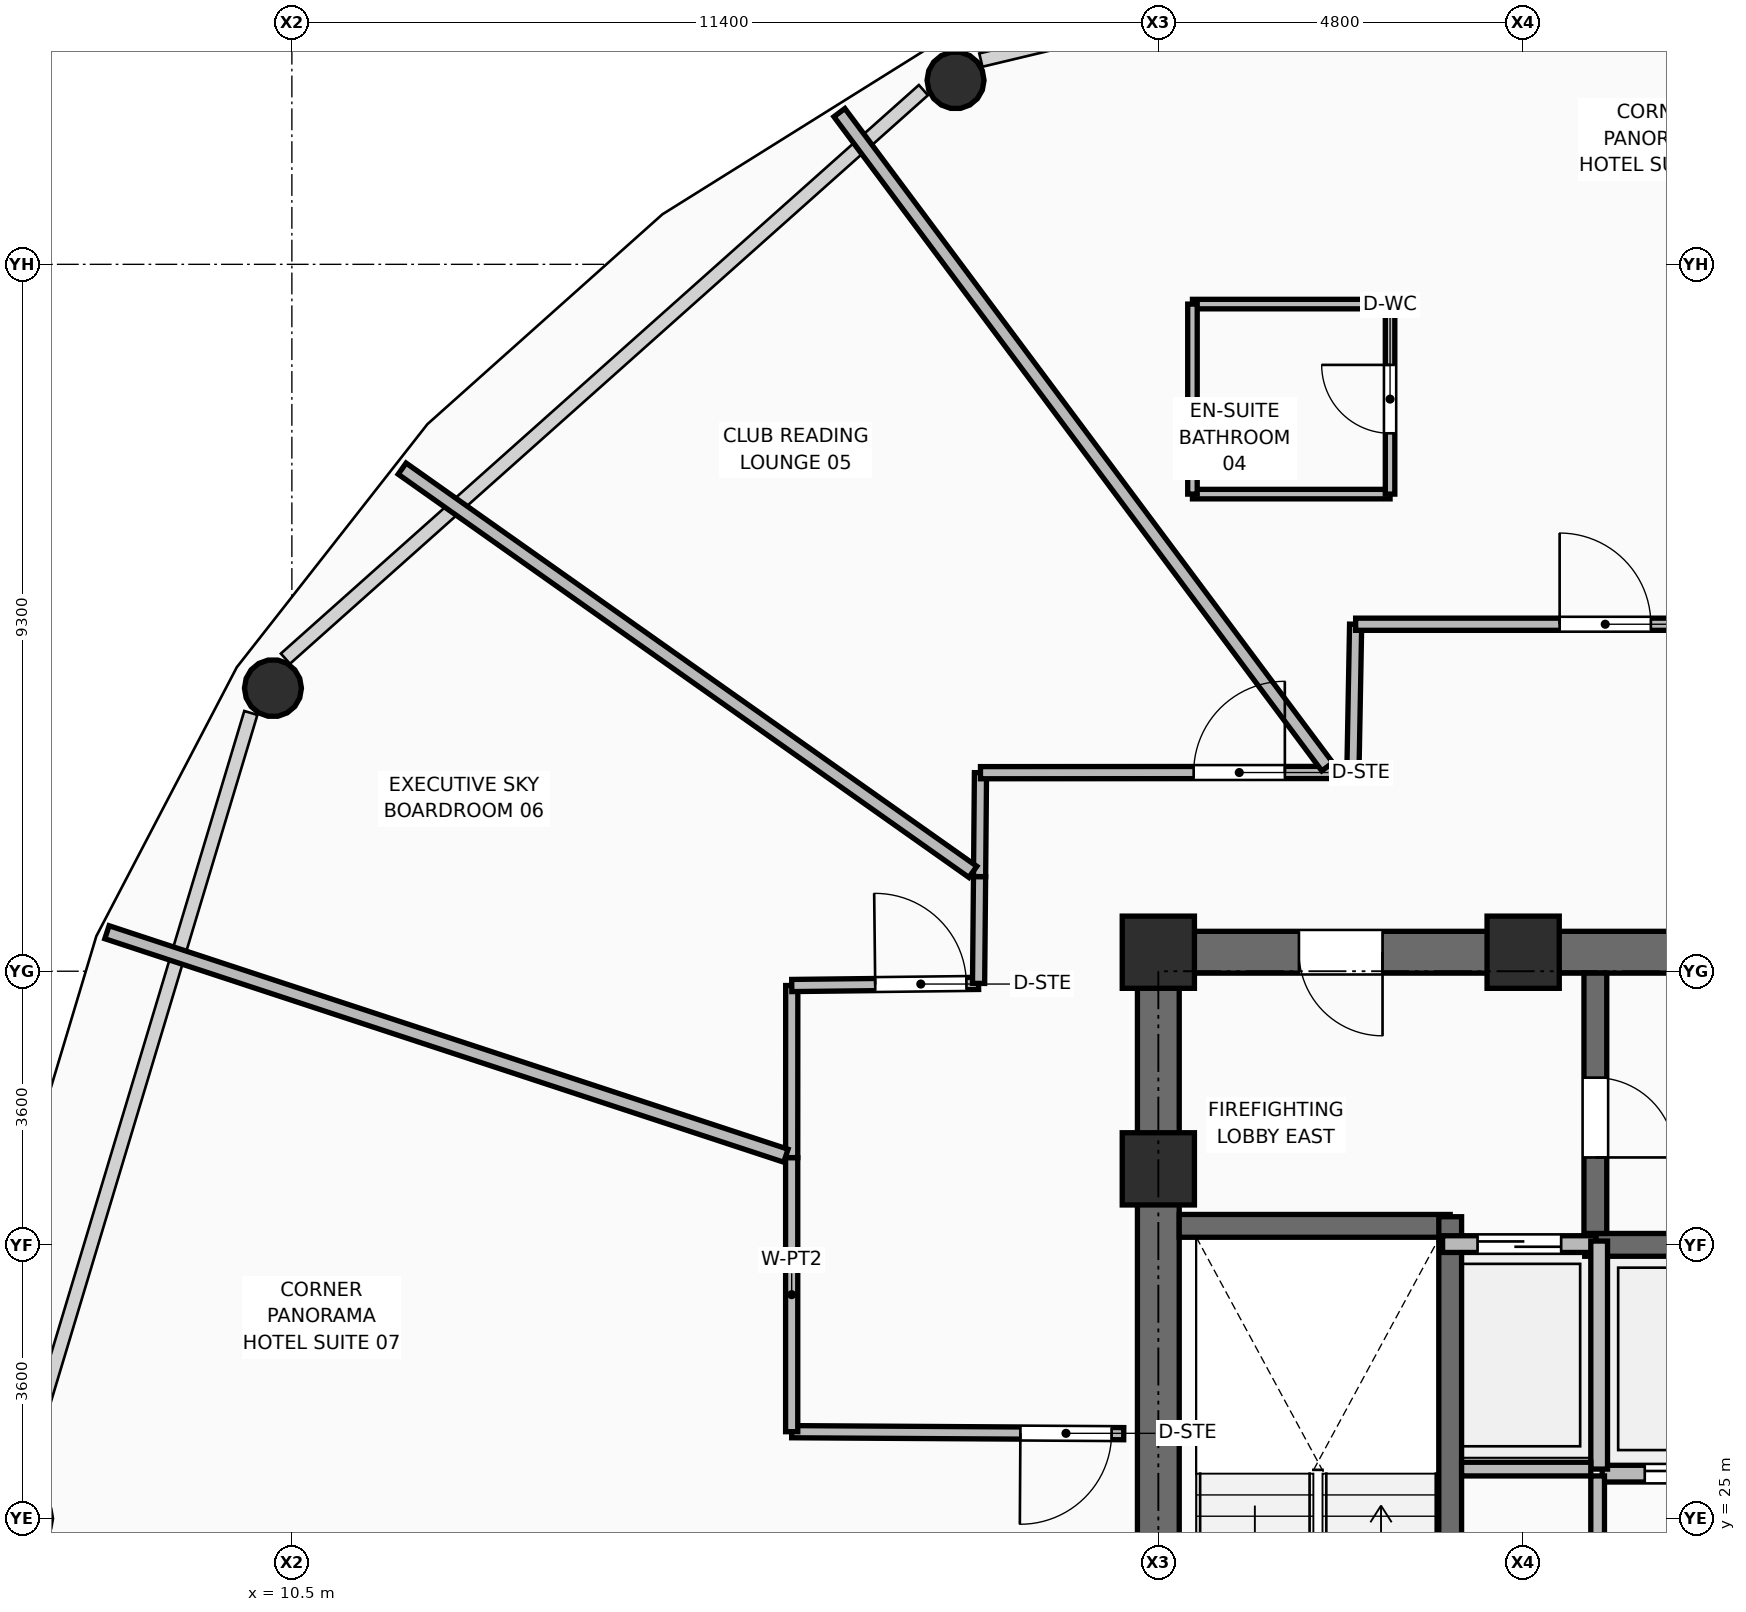
"""IFC4 building model, lengths in metres.
Left out: names, types, materials, properties, quantities, classifications, styles, units other than length and angle.
Written with IfcOpenShell. Run it as: python <this file> out.ifc"""

import sys

from ifc_helpers import new_model, si_unit, direction, frame, frame_2d, origin, origin_2d, place, context, subcontext, project, spatial, rectangle, hollow_circle, extrude, element, fill, save


model = new_model("IFC4")
c1 = context("Model", 3, precision=1e-05, world=origin(), true_north=direction((0.0, 1.0)))
c2 = subcontext(c1, "Body", "Model", "MODEL_VIEW")
j1 = project(units=[si_unit("LENGTHUNIT", "METRE"), si_unit("PLANEANGLEUNIT", "RADIAN")], contexts=[c1])
p1 = place(None, origin())
s1 = spatial("IfcSite", under=j1, at=p1, CompositionType="ELEMENT")
p2 = place(p1, origin())
s2 = spatial("IfcBuilding", under=s1, at=p2, CompositionType="ELEMENT")
p3 = place(p2, frame((0.0, 0.0, 164.7)))
s3 = spatial("IfcBuildingStorey", under=s2, at=p3, CompositionType="ELEMENT", Elevation=164.7)
for number, where, z_axis, x_axis in (
    (1, (21.9, 29.6, 0.0), (0.0, 0.0, 1.0), (1.0, 0.0, 0.0)),
    (2, (21.9, 32.45, 0.0), (0.0, 0.0, 1.0), (1.0, 0.0, 0.0)),
    (3, (26.7, 32.45, 0.0), (0.0, 0.0, 1.0), (1.0, 0.0, 0.0)),
):
    element("IfcColumn", number, at=place(p3, frame(where, z_axis=z_axis, x_axis=x_axis)), inside=s3, PredefinedType="COLUMN", context=c2, shape_type="SweptSolid", body=[
        extrude(rectangle(XDim=0.95, YDim=0.95, at=origin_2d()), origin(), (0.0, 0.0, 1.0), 3.75),
    ])
for number, where, z_axis, x_axis in (
    (4, (19.232, 43.921, 0.0), (0.0, 0.0, 1.0), (1.0, 0.0, 0.0)),
    (5, (10.251, 35.924, 0.0), (0.0, 0.0, 1.0), (1.0, 0.0, 0.0)),
):
    element("IfcColumn", number, at=place(p3, frame(where, z_axis=z_axis, x_axis=x_axis)), inside=s3, PredefinedType="COLUMN", context=c2, shape_type="SweptSolid", body=[
        extrude(hollow_circle(Radius=0.375, WallThickness=0.035, at=origin_2d()), origin(), (0.0, 0.0, 1.0), 3.57),
    ])
p4 = place(p3, frame((21.625, 32.45, 0.0), z_axis=(0.0, 0.0, 1.0), x_axis=(1.0, 0.0, 0.0)))
e6 = element("IfcWall", 6, at=p4, inside=s3, PredefinedType="SHEAR", context=c2, shape_type="SweptSolid", body=[
    extrude(rectangle(XDim=19.75, YDim=0.55, at=frame_2d((9.875, 0.0))), origin(), (0.0, 0.0, 1.0), 3.57),
])
p5 = place(p4, frame((2.125, 0.0, 0.0)))
e7 = element("IfcOpeningElement", 7, at=p5, cuts=e6, PredefinedType="OPENING", context=c2, shape_type="SweptSolid", body=[
    extrude(rectangle(XDim=1.1, YDim=2.1, at=frame_2d((0.55, 1.05))), frame((0.0, 0.285, 0.0), z_axis=(0.0, -1.0, 0.0), x_axis=(1.0, 0.0, 0.0)), (0.0, 0.0, 1.0), 0.57),
])
p6 = place(p4, frame((15.515, 0.0, 0.0)))
e8 = element("IfcOpeningElement", 8, at=p6, cuts=e6, PredefinedType="OPENING", context=c2, shape_type="SweptSolid", body=[
    extrude(rectangle(XDim=1.0, YDim=2.1, at=frame_2d((0.5, 1.05))), frame((0.0, 0.285, 0.0), z_axis=(0.0, -1.0, 0.0), x_axis=(1.0, 0.0, 0.0)), (0.0, 0.0, 1.0), 0.57),
])
p7 = place(p4, frame((17.525, 0.0, 0.0)))
e9 = element("IfcOpeningElement", 9, at=p7, cuts=e6, PredefinedType="OPENING", context=c2, shape_type="SweptSolid", body=[
    extrude(rectangle(XDim=0.9, YDim=2.1, at=frame_2d((0.45, 1.05))), frame((0.0, 0.285, 0.0), z_axis=(0.0, -1.0, 0.0), x_axis=(1.0, 0.0, 0.0)), (0.0, 0.0, 1.0), 0.57),
])
p8 = place(p3, frame((21.9, 18.075, 0.0), z_axis=(0.0, 0.0, 1.0), x_axis=(0.0, 1.0, 0.0)))
e10 = element("IfcWall", 10, at=p8, inside=s3, PredefinedType="SHEAR", context=c2, shape_type="SweptSolid", body=[
    extrude(rectangle(XDim=14.1, YDim=0.55, at=frame_2d((7.05, 0.0))), origin(), (0.0, 0.0, 1.0), 3.57),
])
p9 = place(p3, frame((22.175, 28.85, 0.0), z_axis=(0.0, 0.0, 1.0), x_axis=(1.0, 0.0, 0.0)))
e11 = element("IfcWall", 11, at=p9, inside=s3, PredefinedType="SHEAR", context=c2, shape_type="SweptSolid", body=[
    extrude(rectangle(XDim=3.565, YDim=0.3, at=frame_2d((1.782, 0.0))), origin(), (0.0, 0.0, 1.0), 3.57),
])
p10 = place(p3, frame((25.74, 20.98, 0.0), z_axis=(0.0, 0.0, 1.0), x_axis=(0.0, 1.0, 0.0)))
e12 = element("IfcWall", 12, at=p10, inside=s3, PredefinedType="SHEAR", context=c2, shape_type="SweptSolid", body=[
    extrude(rectangle(XDim=7.99, YDim=0.3, at=frame_2d((3.995, 0.0))), origin(), (0.0, 0.0, 1.0), 3.57),
])
p11 = place(p3, frame((27.51, 28.6, 0.0), z_axis=(0.0, 0.0, 1.0), x_axis=(1.0, 0.0, 0.0)))
e13 = element("IfcWall", 13, at=p11, inside=s3, PredefinedType="SHEAR", context=c2, shape_type="SweptSolid", body=[
    extrude(rectangle(XDim=8.03, YDim=0.3, at=frame_2d((4.015, 0.0))), origin(), (0.0, 0.0, 1.0), 3.57),
])
p12 = place(p3, frame((27.65, 28.75, 0.0), z_axis=(0.0, 0.0, 1.0), x_axis=(0.0, 1.0, 0.0)))
e14 = element("IfcWall", 14, at=p12, inside=s3, PredefinedType="SHEAR", context=c2, shape_type="SweptSolid", body=[
    extrude(rectangle(XDim=3.425, YDim=0.3, at=frame_2d((1.712, 0.0))), origin(), (0.0, 0.0, 1.0), 3.57),
])
p13 = place(p12, frame((1.0, 0.0, 0.0)))
e15 = element("IfcOpeningElement", 15, at=p13, cuts=e14, PredefinedType="OPENING", context=c2, shape_type="SweptSolid", body=[
    extrude(rectangle(XDim=1.05, YDim=2.1, at=frame_2d((0.525, 1.05))), frame((0.0, 0.16, 0.0), z_axis=(0.0, -1.0, 0.0), x_axis=(1.0, 0.0, 0.0)), (0.0, 0.0, 1.0), 0.32),
])
p14 = place(p3, frame((25.64, 28.61, 0.0), z_axis=(0.0, 0.0, 1.0), x_axis=(1.0, 0.0, 0.0)))
e16 = element("IfcWall", 16, at=p14, inside=s3, PredefinedType="PARTITIONING", context=c2, shape_type="SweptSolid", body=[
    extrude(rectangle(XDim=2.02, YDim=0.22, at=frame_2d((1.01, 0.0))), origin(), (0.0, 0.0, 1.0), 3.55),
])
p15 = place(p14, frame((0.46, 0.0, 0.0)))
e17 = element("IfcOpeningElement", 17, at=p15, cuts=e16, PredefinedType="OPENING", context=c2, shape_type="SweptSolid", body=[
    extrude(rectangle(XDim=1.1, YDim=2.2, at=frame_2d((0.55, 1.1))), frame((0.0, 0.12, 0.0), z_axis=(0.0, -1.0, 0.0), x_axis=(1.0, 0.0, 0.0)), (0.0, 0.0, 1.0), 0.24),
])
p16 = place(p3, frame((27.74, 25.59, 0.0), z_axis=(0.0, 0.0, 1.0), x_axis=(1.0, 0.0, 0.0)))
e18 = element("IfcWall", 18, at=p16, inside=s3, PredefinedType="PARTITIONING", context=c2, shape_type="SweptSolid", body=[
    extrude(rectangle(XDim=2.22, YDim=0.22, at=frame_2d((1.11, 0.0))), origin(), (0.0, 0.0, 1.0), 3.55),
])
p17 = place(p16, frame((0.56, 0.0, 0.0)))
e19 = element("IfcOpeningElement", 19, at=p17, cuts=e18, PredefinedType="OPENING", context=c2, shape_type="SweptSolid", body=[
    extrude(rectangle(XDim=1.1, YDim=2.2, at=frame_2d((0.55, 1.1))), frame((0.0, 0.12, 0.0), z_axis=(0.0, -1.0, 0.0), x_axis=(1.0, 0.0, 0.0)), (0.0, 0.0, 1.0), 0.24),
])
p18 = place(p3, frame((27.7, 25.65, 0.0), z_axis=(0.0, 0.0, 1.0), x_axis=(0.0, 1.0, 0.0)))
e20 = element("IfcWall", 20, at=p18, inside=s3, PredefinedType="PARTITIONING", context=c2, shape_type="SweptSolid", body=[
    extrude(rectangle(XDim=3.0, YDim=0.22, at=frame_2d((1.5, 0.0))), origin(), (0.0, 0.0, 1.0), 3.55),
])
p19 = place(p3, frame((25.89, 25.65, 0.0), z_axis=(0.0, 0.0, 1.0), x_axis=(1.0, 0.0, 0.0)))
e21 = element("IfcWall", 21, at=p19, inside=s3, PredefinedType="PARTITIONING", context=c2, shape_type="SweptSolid", body=[
    extrude(rectangle(XDim=1.7, YDim=0.18, at=frame_2d((0.85, 0.0))), origin(), (0.0, 0.0, 1.0), 3.55),
])
p20 = place(p3, frame((27.68, 21.19, 0.0), z_axis=(0.0, 0.0, 1.0), x_axis=(0.0, 1.0, 0.0)))
e22 = element("IfcWall", 22, at=p20, inside=s3, PredefinedType="PARTITIONING", context=c2, shape_type="SweptSolid", body=[
    extrude(rectangle(XDim=4.37, YDim=0.18, at=frame_2d((2.185, 0.0))), origin(), (0.0, 0.0, 1.0), 3.55),
])
p21 = place(p20, frame((1.735, 0.0, 0.0)))
e23 = element("IfcOpeningElement", 23, at=p21, cuts=e22, PredefinedType="OPENING", context=c2, shape_type="SweptSolid", body=[
    extrude(rectangle(XDim=0.9, YDim=2.1, at=frame_2d((0.45, 1.05))), frame((0.0, 0.1, 0.0), z_axis=(0.0, -1.0, 0.0), x_axis=(1.0, 0.0, 0.0)), (0.0, 0.0, 1.0), 0.2),
])
p22 = place(p3, frame((21.445, 26.116, 0.0), z_axis=(0.0, 0.0, 1.0), x_axis=(-0.99998212632, 0.005978882852, 0.0)))
e24 = element("IfcWall", 24, at=p22, inside=s3, PredefinedType="PARTITIONING", context=c2, shape_type="SweptSolid", body=[
    extrude(rectangle(XDim=4.369, YDim=0.16, at=frame_2d((2.185, 0.0))), origin(), (0.0, 0.0, 1.0), 2.595),
])
p23 = place(p22, frame((0.16, 0.0, 0.0)))
e25 = element("IfcOpeningElement", 25, at=p23, cuts=e24, PredefinedType="OPENING", context=c2, shape_type="SweptSolid", body=[
    extrude(rectangle(XDim=1.2, YDim=2.1, at=frame_2d((0.6, 1.05))), frame((0.0, 0.09, 0.0), z_axis=(0.0, -1.0, 0.0), x_axis=(1.0, 0.0, 0.0)), (0.0, 0.0, 1.0), 0.18),
])
p24 = place(p3, frame((17.076, 26.142, 0.0), z_axis=(0.0, 0.0, 1.0), x_axis=(0.0, 1.0, 0.0)))
e26 = element("IfcWall", 26, at=p24, inside=s3, PredefinedType="PARTITIONING", context=c2, shape_type="SweptSolid", body=[
    extrude(rectangle(XDim=3.606, YDim=0.16, at=frame_2d((1.803, 0.0))), origin(), (0.0, 0.0, 1.0), 3.55),
])
p25 = place(p3, frame((17.076, 29.748, 0.0), z_axis=(0.0, 0.0, 1.0), x_axis=(0.000431359822, 0.999999906964, 0.0)))
e27 = element("IfcWall", 27, at=p25, inside=s3, PredefinedType="PARTITIONING", context=c2, shape_type="SweptSolid", body=[
    extrude(rectangle(XDim=2.264, YDim=0.16, at=frame_2d((1.132, 0.0))), origin(), (0.0, 0.0, 1.0), 3.55),
])
p26 = place(p3, frame((17.077, 32.012, 0.0), z_axis=(0.0, 0.0, 1.0), x_axis=(0.999934771592, 0.011421583108, 0.0)))
e28 = element("IfcWall", 28, at=p26, inside=s3, PredefinedType="PARTITIONING", context=c2, shape_type="SweptSolid", body=[
    extrude(rectangle(XDim=2.458, YDim=0.16, at=frame_2d((1.229, 0.0))), origin(), (0.0, 0.0, 1.0), 3.55),
])
p27 = place(p26, frame((1.098, 0.0, 0.0)))
e29 = element("IfcOpeningElement", 29, at=p27, cuts=e28, PredefinedType="OPENING", context=c2, shape_type="SweptSolid", body=[
    extrude(rectangle(XDim=1.2, YDim=2.1, at=frame_2d((0.6, 1.05))), frame((0.0, 0.09, 0.0), z_axis=(0.0, -1.0, 0.0), x_axis=(1.0, 0.0, 0.0)), (0.0, 0.0, 1.0), 0.18),
])
p28 = place(p3, frame((19.535, 32.04, 0.0), z_axis=(0.0, 0.0, 1.0), x_axis=(0.009382732056, 0.999955981201, 0.0)))
e30 = element("IfcWall", 30, at=p28, inside=s3, PredefinedType="PARTITIONING", context=c2, shape_type="SweptSolid", body=[
    extrude(rectangle(XDim=1.405, YDim=0.16, at=frame_2d((0.703, 0.0))), origin(), (0.0, 0.0, 1.0), 3.006),
])
p29 = place(p3, frame((19.548, 33.445, 0.0), z_axis=(0.0, 0.0, 1.0), x_axis=(0.008751227658, 0.999961707274, 0.0)))
e31 = element("IfcWall", 31, at=p29, inside=s3, PredefinedType="PARTITIONING", context=c2, shape_type="SweptSolid", body=[
    extrude(rectangle(XDim=1.367, YDim=0.16, at=frame_2d((0.684, 0.0))), origin(), (0.0, 0.0, 1.0), 3.55),
])
p30 = place(p3, frame((19.56, 34.812, 0.0), z_axis=(0.0, 0.0, 1.0), x_axis=(0.999999821253, 0.000597907217, 0.0)))
e32 = element("IfcWall", 32, at=p30, inside=s3, PredefinedType="PARTITIONING", context=c2, shape_type="SweptSolid", body=[
    extrude(rectangle(XDim=4.9, YDim=0.16, at=frame_2d((2.45, 0.0))), origin(), (0.0, 0.0, 1.0), 3.006),
])
p31 = place(p30, frame((2.805, 0.0, 0.0)))
e33 = element("IfcOpeningElement", 33, at=p31, cuts=e32, PredefinedType="OPENING", context=c2, shape_type="SweptSolid", body=[
    extrude(rectangle(XDim=1.2, YDim=2.1, at=frame_2d((0.6, 1.05))), frame((0.0, 0.09, 0.0), z_axis=(0.0, -1.0, 0.0), x_axis=(1.0, 0.0, 0.0)), (0.0, 0.0, 1.0), 0.18),
])
p32 = place(p3, frame((24.46, 34.815, 0.0), z_axis=(0.0, 0.0, 1.0), x_axis=(0.018526930954, 0.999828361685, 0.0)))
e34 = element("IfcWall", 34, at=p32, inside=s3, PredefinedType="PARTITIONING", context=c2, shape_type="SweptSolid", body=[
    extrude(rectangle(XDim=1.95, YDim=0.16, at=frame_2d((0.975, 0.0))), origin(), (0.0, 0.0, 1.0), 3.55),
])
p33 = place(p3, frame((24.496, 36.765, 0.0), z_axis=(0.0, 0.0, 1.0), x_axis=(1.0, 0.0, 0.0)))
e35 = element("IfcWall", 35, at=p33, inside=s3, PredefinedType="PARTITIONING", context=c2, shape_type="SweptSolid", body=[
    extrude(rectangle(XDim=7.458, YDim=0.16, at=frame_2d((3.729, 0.0))), origin(), (0.0, 0.0, 1.0), 3.006),
])
p34 = place(p33, frame((2.684, 0.0, 0.0)))
e36 = element("IfcOpeningElement", 36, at=p34, cuts=e35, PredefinedType="OPENING", context=c2, shape_type="SweptSolid", body=[
    extrude(rectangle(XDim=1.2, YDim=2.1, at=frame_2d((0.6, 1.05))), frame((0.0, 0.09, 0.0), z_axis=(0.0, -1.0, 0.0), x_axis=(1.0, 0.0, 0.0)), (0.0, 0.0, 1.0), 0.18),
])
p35 = place(p3, frame((24.123, 34.89, 0.0), z_axis=(0.0, 0.0, 1.0), x_axis=(-0.597869450308, 0.80159348824, 0.0)))
e37 = element("IfcWall", 37, at=p35, inside=s3, PredefinedType="PARTITIONING", context=c2, shape_type="SweptSolid", body=[
    extrude(rectangle(XDim=10.736, YDim=0.18, at=frame_2d((5.368, 0.0))), origin(), (0.0, 0.0, 1.0), 2.852),
])
p36 = place(p3, frame((19.46, 33.507, 0.0), z_axis=(0.0, 0.0, 1.0), x_axis=(-0.816740398998, 0.577005303827, 0.0)))
e38 = element("IfcWall", 38, at=p36, inside=s3, PredefinedType="PARTITIONING", context=c2, shape_type="SweptSolid", body=[
    extrude(rectangle(XDim=9.194, YDim=0.18, at=frame_2d((4.597, 0.0))), origin(), (0.0, 0.0, 1.0), 2.852),
])
p37 = place(p3, frame((17.0, 29.773, 0.0), z_axis=(0.0, 0.0, 1.0), x_axis=(-0.949880965401, 0.312611822502, 0.0)))
e39 = element("IfcWall", 39, at=p37, inside=s3, PredefinedType="PARTITIONING", context=c2, shape_type="SweptSolid", body=[
    extrude(rectangle(XDim=9.405, YDim=0.18, at=frame_2d((4.702, 0.0))), origin(), (0.0, 0.0, 1.0), 2.852),
])
for number, where, z_axis, x_axis in (
    (40, (22.349, 38.477, 0.0), (0.0, 0.0, 1.0), (1.0, 0.0, 0.0)),
    (41, (22.349, 40.977, 0.0), (0.0, 0.0, 1.0), (1.0, 0.0, 0.0)),
):
    element("IfcWall", number, at=place(p3, frame(where, z_axis=z_axis, x_axis=x_axis)), inside=s3, PredefinedType="PARTITIONING", context=c2, shape_type="SweptSolid", body=[
        extrude(rectangle(XDim=2.6, YDim=0.125, at=frame_2d((1.3, 0.0))), origin(), (0.0, 0.0, 1.0), 3.55),
    ])
p38 = place(p3, frame((22.349, 38.477, 0.0), z_axis=(0.0, 0.0, 1.0), x_axis=(0.0, 1.0, 0.0)))
e42 = element("IfcWall", 42, at=p38, inside=s3, PredefinedType="PARTITIONING", context=c2, shape_type="SweptSolid", body=[
    extrude(rectangle(XDim=2.5, YDim=0.125, at=frame_2d((1.25, 0.0))), origin(), (0.0, 0.0, 1.0), 3.55),
])
p39 = place(p3, frame((24.949, 38.477, 0.0), z_axis=(0.0, 0.0, 1.0), x_axis=(0.0, 1.0, 0.0)))
e43 = element("IfcWall", 43, at=p39, inside=s3, PredefinedType="PARTITIONING", context=c2, shape_type="SweptSolid", body=[
    extrude(rectangle(XDim=2.5, YDim=0.125, at=frame_2d((1.25, 0.0))), origin(), (0.0, 0.0, 1.0), 3.55),
])
p40 = place(p39, frame((0.8, 0.0, 0.0)))
e44 = element("IfcOpeningElement", 44, at=p40, cuts=e43, PredefinedType="OPENING", context=c2, shape_type="SweptSolid", body=[
    extrude(rectangle(XDim=0.9, YDim=2.1, at=frame_2d((0.45, 1.05))), frame((0.0, 0.073, 0.0), z_axis=(0.0, -1.0, 0.0), x_axis=(1.0, 0.0, 0.0)), (0.0, 0.0, 1.0), 0.145),
])
p41 = place(p13, frame((1.05, 0.0, 0.0), z_axis=(0.0, 0.0, 1.0), x_axis=(-1.0, 0.0, 0.0)))
e45 = element("IfcDoor", 45, at=p41, inside=s3, OperationType="SINGLE_SWING_RIGHT", PredefinedType="DOOR", context=c2, shape_type="SweptSolid", body=[
    extrude(rectangle(XDim=1.05, YDim=2.1, at=frame_2d((0.525, 1.05))), frame((0.0, 0.025, 0.0), z_axis=(0.0, -1.0, 0.0), x_axis=(1.0, 0.0, 0.0)), (0.0, 0.0, 1.0), 0.05),
])
fill(e15, e45)
p42 = place(p15, origin())
e46 = element("IfcDoor", 46, at=p42, inside=s3, OperationType="DOUBLE_DOOR_SLIDING", PredefinedType="DOOR", context=c2, shape_type="SweptSolid", body=[
    extrude(rectangle(XDim=1.1, YDim=2.2, at=frame_2d((0.55, 1.1))), frame((0.0, 0.025, 0.0), z_axis=(0.0, -1.0, 0.0), x_axis=(1.0, 0.0, 0.0)), (0.0, 0.0, 1.0), 0.05),
])
fill(e17, e46)
p43 = place(p17, frame((1.1, 0.0, 0.0), z_axis=(0.0, 0.0, 1.0), x_axis=(-1.0, 0.0, 0.0)))
e47 = element("IfcDoor", 47, at=p43, inside=s3, OperationType="DOUBLE_DOOR_SLIDING", PredefinedType="DOOR", context=c2, shape_type="SweptSolid", body=[
    extrude(rectangle(XDim=1.1, YDim=2.2, at=frame_2d((0.55, 1.1))), frame((0.0, 0.025, 0.0), z_axis=(0.0, -1.0, 0.0), x_axis=(1.0, 0.0, 0.0)), (0.0, 0.0, 1.0), 0.05),
])
fill(e19, e47)
p44 = place(p5, frame((1.1, 0.0, 0.0), z_axis=(0.0, 0.0, 1.0), x_axis=(-1.0, 0.0, 0.0)))
e48 = element("IfcDoor", 48, at=p44, inside=s3, OperationType="SINGLE_SWING_LEFT", PredefinedType="DOOR", context=c2, shape_type="SweptSolid", body=[
    extrude(rectangle(XDim=1.1, YDim=2.1, at=frame_2d((0.55, 1.05))), frame((0.0, 0.025, 0.0), z_axis=(0.0, -1.0, 0.0), x_axis=(1.0, 0.0, 0.0)), (0.0, 0.0, 1.0), 0.05),
])
fill(e7, e48)
p45 = place(p40, origin())
e49 = element("IfcDoor", 49, at=p45, inside=s3, OperationType="SINGLE_SWING_RIGHT", PredefinedType="DOOR", context=c2, shape_type="SweptSolid", body=[
    extrude(rectangle(XDim=0.9, YDim=2.1, at=frame_2d((0.45, 1.05))), frame((0.0, 0.025, 0.0), z_axis=(0.0, -1.0, 0.0), x_axis=(1.0, 0.0, 0.0)), (0.0, 0.0, 1.0), 0.05),
])
fill(e44, e49)
p46 = place(p34, origin())
e50 = element("IfcDoor", 50, at=p46, inside=s3, OperationType="SINGLE_SWING_LEFT", PredefinedType="DOOR", context=c2, shape_type="SweptSolid", body=[
    extrude(rectangle(XDim=1.2, YDim=2.1, at=frame_2d((0.6, 1.05))), frame((0.0, 0.025, 0.0), z_axis=(0.0, -1.0, 0.0), x_axis=(1.0, 0.0, 0.0)), (0.0, 0.0, 1.0), 0.05),
])
fill(e36, e50)
p47 = place(p31, origin())
e51 = element("IfcDoor", 51, at=p47, inside=s3, OperationType="SINGLE_SWING_RIGHT", PredefinedType="DOOR", context=c2, shape_type="SweptSolid", body=[
    extrude(rectangle(XDim=1.2, YDim=2.1, at=frame_2d((0.6, 1.05))), frame((0.0, 0.025, 0.0), z_axis=(0.0, -1.0, 0.0), x_axis=(1.0, 0.0, 0.0)), (0.0, 0.0, 1.0), 0.05),
])
fill(e33, e51)
p48 = place(p27, origin())
e52 = element("IfcDoor", 52, at=p48, inside=s3, OperationType="SINGLE_SWING_LEFT", PredefinedType="DOOR", context=c2, shape_type="SweptSolid", body=[
    extrude(rectangle(XDim=1.2, YDim=2.1, at=frame_2d((0.6, 1.05))), frame((0.0, 0.025, 0.0), z_axis=(0.0, -1.0, 0.0), x_axis=(1.0, 0.0, 0.0)), (0.0, 0.0, 1.0), 0.05),
])
fill(e29, e52)
p49 = place(p23, origin())
e53 = element("IfcDoor", 53, at=p49, inside=s3, OperationType="SINGLE_SWING_RIGHT", PredefinedType="DOOR", context=c2, shape_type="SweptSolid", body=[
    extrude(rectangle(XDim=1.2, YDim=2.1, at=frame_2d((0.6, 1.05))), frame((0.0, 0.025, 0.0), z_axis=(0.0, -1.0, 0.0), x_axis=(1.0, 0.0, 0.0)), (0.0, 0.0, 1.0), 0.05),
])
fill(e25, e53)
save(model, sys.argv[1])
